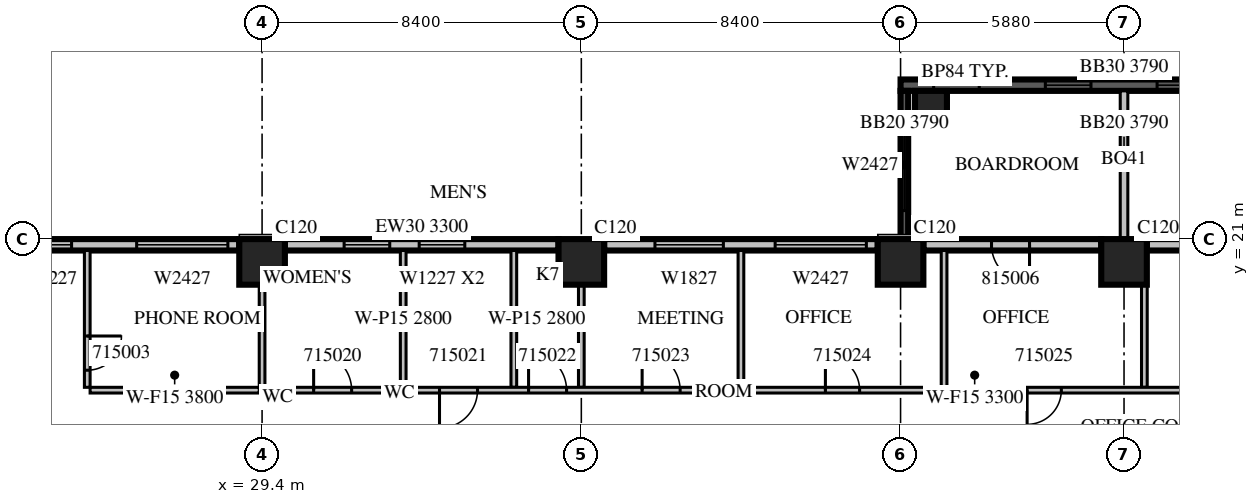
"""IFC4 building model, lengths in metres.
Left out: names, types, materials, properties, quantities, classifications, styles, units other than length and angle.
Written with IfcOpenShell. Run it as: python <this file> out.ifc"""

import sys

from ifc_helpers import new_model, si_unit, direction, frame, frame_2d, origin, origin_2d, place, context, subcontext, project, spatial, rectangle, extrude, source, transform, mapped, element, fill, save


model = new_model("IFC4")
c1 = context("Model", 3, precision=1e-05, world=origin(), true_north=direction((0.0, 1.0)))
c2 = subcontext(c1, "Body", "Model", "MODEL_VIEW")
j1 = project(units=[si_unit("LENGTHUNIT", "METRE"), si_unit("PLANEANGLEUNIT", "RADIAN")], contexts=[c1])
p1 = place(None, origin())
s1 = spatial("IfcSite", under=j1, at=p1, CompositionType="ELEMENT")
p2 = place(p1, origin())
s2 = spatial("IfcBuilding", under=s1, at=p2, CompositionType="ELEMENT")
p3 = place(p2, frame((0.0, 0.0, 74.1)))
s3 = spatial("IfcBuildingStorey", under=s2, at=p3, CompositionType="ELEMENT", Elevation=74.1)
m1 = source(origin(), c2, "Body", "SweptSolid", [
    extrude(rectangle(XDim=1.2, YDim=1.2, at=origin_2d()), origin(), (0.0, 0.0, 1.0), 4.2),
])
for number, where, z_axis, x_axis in (
    (1, (29.4, 20.4, 0.0), (0.0, 0.0, 1.0), (1.0, 0.0, 0.0)),
    (2, (37.8, 20.4, 0.0), (0.0, 0.0, 1.0), (1.0, 0.0, 0.0)),
    (3, (46.2, 20.4, 0.0), (0.0, 0.0, 1.0), (1.0, 0.0, 0.0)),
    (4, (52.08, 20.4, 0.0), (0.0, 0.0, 1.0), (1.0, 0.0, 0.0)),
):
    element("IfcColumn", number, at=place(p3, frame(where, z_axis=z_axis, x_axis=x_axis)), inside=s3, PredefinedType="COLUMN", context=c2, shape_type="MappedRepresentation", body=[
        mapped(m1, transform((0.0, 0.0, 0.0), scale=1.0)),
    ])
m2 = source(origin(), c2, "Body", "SweptSolid", [
    extrude(rectangle(XDim=0.84, YDim=0.84, at=origin_2d()), origin(), (0.0, 0.0, 1.0), 4.2),
])
p4 = place(p3, frame((47.0, 24.48, 0.0), z_axis=(0.0, 0.0, 1.0), x_axis=(1.0, 0.0, 0.0)))
e5 = element("IfcColumn", 5, at=p4, inside=s3, PredefinedType="COLUMN", context=c2, shape_type="MappedRepresentation", body=[
    mapped(m2, transform((0.0, 0.0, 0.0), scale=1.0)),
])
m3 = source(origin(), c2, "Body", "SweptSolid", [
    extrude(rectangle(XDim=11.76, YDim=0.3, at=frame_2d((5.88, 0.0))), origin(), (0.0, 0.0, 1.0), 3.79),
])
p5 = place(p3, frame((57.96, 25.05, 0.0), z_axis=(0.0, 0.0, 1.0), x_axis=(-1.0, 0.0, 0.0)))
e6 = element("IfcWall", 6, at=p5, inside=s3, PredefinedType="SOLIDWALL", context=c2, shape_type="MappedRepresentation", body=[
    mapped(m3, transform((0.0, 0.0, 0.0), scale=1.0)),
])
m4 = source(origin(), c2, "Body", "SweptSolid", [
    extrude(rectangle(XDim=1.2, YDim=2.7, at=frame_2d((0.6, 1.35))), frame((0.0, 0.16, 0.0), z_axis=(0.0, -1.0, 0.0), x_axis=(1.0, 0.0, 0.0)), (0.0, 0.0, 1.0), 0.32),
])
p6 = place(p5, frame((0.87, 0.0, 0.6)))
e7 = element("IfcOpeningElement", 7, at=p6, cuts=e6, PredefinedType="OPENING", context=c2, shape_type="MappedRepresentation", body=[
    mapped(m4, transform((0.0, 0.0, 0.0), scale=1.0)),
])
p7 = place(p5, frame((3.81, 0.0, 0.6)))
e8 = element("IfcOpeningElement", 8, at=p7, cuts=e6, PredefinedType="OPENING", context=c2, shape_type="MappedRepresentation", body=[
    mapped(m4, transform((0.0, 0.0, 0.0), scale=1.0)),
])
p8 = place(p5, frame((6.75, 0.0, 0.6)))
e9 = element("IfcOpeningElement", 9, at=p8, cuts=e6, PredefinedType="OPENING", context=c2, shape_type="MappedRepresentation", body=[
    mapped(m4, transform((0.0, 0.0, 0.0), scale=1.0)),
])
p9 = place(p5, frame((9.69, 0.0, 0.6)))
e10 = element("IfcOpeningElement", 10, at=p9, cuts=e6, PredefinedType="OPENING", context=c2, shape_type="MappedRepresentation", body=[
    mapped(m4, transform((0.0, 0.0, 0.0), scale=1.0)),
])
m5 = source(origin(), c2, "Body", "SweptSolid", [
    extrude(rectangle(XDim=3.9, YDim=0.2, at=frame_2d((1.95, 0.0))), origin(), (0.0, 0.0, 1.0), 3.79),
])
p10 = place(p3, frame((52.08, 21.0, 0.0), z_axis=(0.0, 0.0, 1.0), x_axis=(0.0, 1.0, 0.0)))
e11 = element("IfcWall", 11, at=p10, inside=s3, PredefinedType="SOLIDWALL", context=c2, shape_type="MappedRepresentation", body=[
    mapped(m5, transform((0.0, 0.0, 0.0), scale=1.0)),
])
m6 = source(origin(), c2, "Body", "SweptSolid", [
    extrude(rectangle(XDim=3.9, YDim=0.2, at=frame_2d((1.95, 0.0))), origin(), (0.0, 0.0, 1.0), 3.79),
])
p11 = place(p3, frame((46.3, 21.0, 0.0), z_axis=(0.0, 0.0, 1.0), x_axis=(0.0, 1.0, 0.0)))
e12 = element("IfcWall", 12, at=p11, inside=s3, PredefinedType="SOLIDWALL", context=c2, shape_type="MappedRepresentation", body=[
    mapped(m6, transform((0.0, 0.0, 0.0), scale=1.0)),
])
m7 = source(origin(), c2, "Body", "SweptSolid", [
    extrude(rectangle(XDim=2.4, YDim=2.7, at=frame_2d((1.2, 1.35))), frame((0.0, 0.11, 0.0), z_axis=(0.0, -1.0, 0.0), x_axis=(1.0, 0.0, 0.0)), (0.0, 0.0, 1.0), 0.22),
])
p12 = place(p11, frame((0.75, 0.0, 0.6)))
e13 = element("IfcOpeningElement", 13, at=p12, cuts=e12, PredefinedType="OPENING", context=c2, shape_type="MappedRepresentation", body=[
    mapped(m7, transform((0.0, 0.0, 0.0), scale=1.0)),
])
m8 = source(origin(), c2, "Body", "SweptSolid", [
    extrude(rectangle(XDim=4.68, YDim=0.3, at=frame_2d((2.34, 0.0))), origin(), (0.0, 0.0, 1.0), 3.8),
])
p13 = place(p3, frame((57.36, 20.85, 0.0), z_axis=(0.0, 0.0, 1.0), x_axis=(-1.0, 0.0, 0.0)))
e14 = element("IfcWall", 14, at=p13, inside=s3, PredefinedType="STANDARD", context=c2, shape_type="MappedRepresentation", body=[
    mapped(m8, transform((0.0, 0.0, 0.0), scale=1.0)),
])
m9 = source(origin(), c2, "Body", "SweptSolid", [
    extrude(rectangle(XDim=1.0, YDim=2.1, at=frame_2d((0.5, 1.05))), frame((0.0, 0.16, 0.0), z_axis=(0.0, -1.0, 0.0), x_axis=(1.0, 0.0, 0.0)), (0.0, 0.0, 1.0), 0.32),
])
p14 = place(p13, frame((1.793, 0.0, 0.0)))
e15 = element("IfcOpeningElement", 15, at=p14, cuts=e14, PredefinedType="OPENING", context=c2, shape_type="MappedRepresentation", body=[
    mapped(m9, transform((0.0, 0.0, 0.0), scale=1.0)),
])
p15 = place(p3, frame((51.48, 20.85, 0.0), z_axis=(0.0, 0.0, 1.0), x_axis=(-1.0, 0.0, 0.0)))
e16 = element("IfcWall", 16, at=p15, inside=s3, PredefinedType="STANDARD", context=c2, shape_type="MappedRepresentation", body=[
    mapped(m8, transform((0.0, 0.0, 0.0), scale=1.0)),
])
p16 = place(p15, frame((1.887, 0.0, 0.0)))
e17 = element("IfcOpeningElement", 17, at=p16, cuts=e16, PredefinedType="OPENING", context=c2, shape_type="MappedRepresentation", body=[
    mapped(m9, transform((0.0, 0.0, 0.0), scale=1.0)),
])
m10 = source(origin(), c2, "Body", "SweptSolid", [
    extrude(rectangle(XDim=7.2, YDim=0.3, at=frame_2d((3.6, 0.0))), origin(), (0.0, 0.0, 1.0), 3.8),
])
p17 = place(p3, frame((45.6, 20.85, 0.0), z_axis=(0.0, 0.0, 1.0), x_axis=(-1.0, 0.0, 0.0)))
e18 = element("IfcWall", 18, at=p17, inside=s3, PredefinedType="STANDARD", context=c2, shape_type="MappedRepresentation", body=[
    mapped(m10, transform((0.0, 0.0, 0.0), scale=1.0)),
])
m11 = source(origin(), c2, "Body", "SweptSolid", [
    extrude(rectangle(XDim=2.4, YDim=2.7, at=frame_2d((1.2, 1.35))), frame((0.0, 0.16, 0.0), z_axis=(0.0, -1.0, 0.0), x_axis=(1.0, 0.0, 0.0)), (0.0, 0.0, 1.0), 0.32),
])
p18 = place(p17, frame((0.3, 0.0, 0.6)))
e19 = element("IfcOpeningElement", 19, at=p18, cuts=e18, PredefinedType="OPENING", context=c2, shape_type="MappedRepresentation", body=[
    mapped(m11, transform((0.0, 0.0, 0.0), scale=1.0)),
])
m12 = source(origin(), c2, "Body", "SweptSolid", [
    extrude(rectangle(XDim=1.8, YDim=2.7, at=frame_2d((0.9, 1.35))), frame((0.0, 0.16, 0.0), z_axis=(0.0, -1.0, 0.0), x_axis=(1.0, 0.0, 0.0)), (0.0, 0.0, 1.0), 0.32),
])
p19 = place(p17, frame((4.062, 0.0, 0.6)))
e20 = element("IfcOpeningElement", 20, at=p19, cuts=e18, PredefinedType="OPENING", context=c2, shape_type="MappedRepresentation", body=[
    mapped(m12, transform((0.0, 0.0, 0.0), scale=1.0)),
])
m13 = source(origin(), c2, "Body", "SweptSolid", [
    extrude(rectangle(XDim=7.2, YDim=0.3, at=frame_2d((3.6, 0.0))), origin(), (0.0, 0.0, 1.0), 3.3),
])
p20 = place(p3, frame((37.2, 20.85, 0.0), z_axis=(0.0, 0.0, 1.0), x_axis=(-1.0, 0.0, 0.0)))
e21 = element("IfcWall", 21, at=p20, inside=s3, PredefinedType="STANDARD", context=c2, shape_type="MappedRepresentation", body=[
    mapped(m13, transform((0.0, 0.0, 0.0), scale=1.0)),
])
p21 = place(p20, frame((2.466, 0.0, 0.6)))
e22 = element("IfcOpeningElement", 22, at=p21, cuts=e21, PredefinedType="OPENING", context=c2, shape_type="MappedRepresentation", body=[
    mapped(m4, transform((0.0, 0.0, 0.0), scale=1.0)),
])
p22 = place(p20, frame((4.441, 0.0, 0.6)))
e23 = element("IfcOpeningElement", 23, at=p22, cuts=e21, PredefinedType="OPENING", context=c2, shape_type="MappedRepresentation", body=[
    mapped(m4, transform((0.0, 0.0, 0.0), scale=1.0)),
])
m14 = source(origin(), c2, "Body", "SweptSolid", [
    extrude(rectangle(XDim=6.6, YDim=0.3, at=frame_2d((3.3, 0.0))), origin(), (0.0, 0.0, 1.0), 3.8),
])
p23 = place(p3, frame((28.8, 20.85, 0.0), z_axis=(0.0, 0.0, 1.0), x_axis=(-1.0, 0.0, 0.0)))
e24 = element("IfcWall", 24, at=p23, inside=s3, PredefinedType="STANDARD", context=c2, shape_type="MappedRepresentation", body=[
    mapped(m14, transform((0.0, 0.0, 0.0), scale=1.0)),
])
p24 = place(p23, frame((0.3, 0.0, 0.6)))
e25 = element("IfcOpeningElement", 25, at=p24, cuts=e24, PredefinedType="OPENING", context=c2, shape_type="MappedRepresentation", body=[
    mapped(m11, transform((0.0, 0.0, 0.0), scale=1.0)),
])
p25 = place(p23, frame((4.412, 0.0, 0.6)))
e26 = element("IfcOpeningElement", 26, at=p25, cuts=e24, PredefinedType="OPENING", context=c2, shape_type="MappedRepresentation", body=[
    mapped(m4, transform((0.0, 0.0, 0.0), scale=1.0)),
])
m15 = source(origin(), c2, "Body", "SweptSolid", [
    extrude(rectangle(XDim=3.6, YDim=0.15, at=frame_2d((1.8, 0.0))), origin(), (0.0, 0.0, 1.0), 3.8),
])
p26 = place(p3, frame((24.8, 20.7, 0.0), z_axis=(0.0, 0.0, 1.0), x_axis=(0.0, -1.0, 0.0)))
e27 = element("IfcWall", 27, at=p26, inside=s3, PredefinedType="PARTITIONING", context=c2, shape_type="MappedRepresentation", body=[
    mapped(m15, transform((0.0, 0.0, 0.0), scale=1.0)),
])
m16 = source(origin(), c2, "Body", "SweptSolid", [
    extrude(rectangle(XDim=0.9, YDim=2.1, at=frame_2d((0.45, 1.05))), frame((0.0, 0.085, 0.0), z_axis=(0.0, -1.0, 0.0), x_axis=(1.0, 0.0, 0.0)), (0.0, 0.0, 1.0), 0.17),
])
p27 = place(p26, frame((2.25, 0.0, 0.0)))
e28 = element("IfcOpeningElement", 28, at=p27, cuts=e27, PredefinedType="OPENING", context=c2, shape_type="MappedRepresentation", body=[
    mapped(m16, transform((0.0, 0.0, 0.0), scale=1.0)),
])
m17 = source(origin(), c2, "Body", "SweptSolid", [
    extrude(rectangle(XDim=4.45, YDim=0.15, at=frame_2d((2.225, 0.0))), origin(), (0.0, 0.0, 1.0), 3.8),
])
p28 = place(p3, frame((24.875, 17.025, 0.0), z_axis=(0.0, 0.0, 1.0), x_axis=(1.0, 0.0, 0.0)))
e29 = element("IfcWall", 29, at=p28, inside=s3, PredefinedType="PARTITIONING", context=c2, shape_type="MappedRepresentation", body=[
    mapped(m17, transform((0.0, 0.0, 0.0), scale=1.0)),
])
m18 = source(origin(), c2, "Body", "SweptSolid", [
    extrude(rectangle(XDim=2.701, YDim=0.15, at=frame_2d((1.351, 0.0))), origin(), (0.0, 0.0, 1.0), 3.8),
])
p29 = place(p3, frame((29.4, 17.1, 0.0), z_axis=(0.0, 0.0, 1.0), x_axis=(0.0, 1.0, 0.0)))
e30 = element("IfcWall", 30, at=p29, inside=s3, PredefinedType="PARTITIONING", context=c2, shape_type="MappedRepresentation", body=[
    mapped(m18, transform((0.0, 0.0, 0.0), scale=1.0)),
])
m19 = source(origin(), c2, "Body", "SweptSolid", [
    extrude(rectangle(XDim=3.6, YDim=0.15, at=frame_2d((1.8, 0.0))), origin(), (0.0, 0.0, 1.0), 2.8),
])
for number, where, z_axis, x_axis in (
    (31, (33.113, 20.7, 0.0), (0.0, 0.0, 1.0), (0.0, -1.0, 0.0)),
    (32, (36.024, 20.7, 0.0), (0.0, 0.0, 1.0), (0.0, -1.0, 0.0)),
):
    element("IfcWall", number, at=place(p3, frame(where, z_axis=z_axis, x_axis=x_axis)), inside=s3, PredefinedType="PARTITIONING", context=c2, shape_type="MappedRepresentation", body=[
        mapped(m19, transform((0.0, 0.0, 0.0), scale=1.0)),
    ])
p30 = place(p3, frame((47.345, 20.7, 0.0), z_axis=(0.0, 0.0, 1.0), x_axis=(0.0, -1.0, 0.0)))
e33 = element("IfcWall", 33, at=p30, inside=s3, PredefinedType="PARTITIONING", context=c2, shape_type="MappedRepresentation", body=[
    mapped(m15, transform((0.0, 0.0, 0.0), scale=1.0)),
])
for number, where, z_axis, x_axis in (
    (34, (52.615, 19.801, 0.0), (0.0, 0.0, 1.0), (0.0, -1.0, 0.0)),
    (35, (37.8, 17.1, 0.0), (0.0, 0.0, 1.0), (0.0, 1.0, 0.0)),
):
    element("IfcWall", number, at=place(p3, frame(where, z_axis=z_axis, x_axis=x_axis)), inside=s3, PredefinedType="PARTITIONING", context=c2, shape_type="MappedRepresentation", body=[
        mapped(m18, transform((0.0, 0.0, 0.0), scale=1.0)),
    ])
p31 = place(p3, frame((42.0, 17.1, 0.0), z_axis=(0.0, 0.0, 1.0), x_axis=(0.0, 1.0, 0.0)))
e36 = element("IfcWall", 36, at=p31, inside=s3, PredefinedType="PARTITIONING", context=c2, shape_type="MappedRepresentation", body=[
    mapped(m15, transform((0.0, 0.0, 0.0), scale=1.0)),
])
m20 = source(origin(), c2, "Body", "SweptSolid", [
    extrude(rectangle(XDim=37.5, YDim=0.15, at=frame_2d((18.75, 0.0))), origin(), (0.0, 0.0, 1.0), 3.3),
])
p32 = place(p3, frame((29.4, 17.025, 0.0), z_axis=(0.0, 0.0, 1.0), x_axis=(1.0, 0.0, 0.0)))
e37 = element("IfcWall", 37, at=p32, inside=s3, PredefinedType="PARTITIONING", context=c2, shape_type="MappedRepresentation", body=[
    mapped(m20, transform((0.0, 0.0, 0.0), scale=1.0)),
])
m21 = source(origin(), c2, "Body", "SweptSolid", [
    extrude(rectangle(XDim=1.0, YDim=2.1, at=frame_2d((0.5, 1.05))), frame((0.0, 0.085, 0.0), z_axis=(0.0, -1.0, 0.0), x_axis=(1.0, 0.0, 0.0)), (0.0, 0.0, 1.0), 0.17),
])
p33 = place(p32, frame((1.357, 0.0, 0.0)))
e38 = element("IfcOpeningElement", 38, at=p33, cuts=e37, PredefinedType="OPENING", context=c2, shape_type="MappedRepresentation", body=[
    mapped(m21, transform((0.0, 0.0, 0.0), scale=1.0)),
])
p34 = place(p32, frame((4.669, 0.0, 0.0)))
e39 = element("IfcOpeningElement", 39, at=p34, cuts=e37, PredefinedType="OPENING", context=c2, shape_type="MappedRepresentation", body=[
    mapped(m21, transform((0.0, 0.0, 0.0), scale=1.0)),
])
p35 = place(p32, frame((7.012, 0.0, 0.0)))
e40 = element("IfcOpeningElement", 40, at=p35, cuts=e37, PredefinedType="OPENING", context=c2, shape_type="MappedRepresentation", body=[
    mapped(m21, transform((0.0, 0.0, 0.0), scale=1.0)),
])
p36 = place(p32, frame((10.0, 0.0, 0.0)))
e41 = element("IfcOpeningElement", 41, at=p36, cuts=e37, PredefinedType="OPENING", context=c2, shape_type="MappedRepresentation", body=[
    mapped(m21, transform((0.0, 0.0, 0.0), scale=1.0)),
])
p37 = place(p32, frame((14.822, 0.0, 0.0)))
e42 = element("IfcOpeningElement", 42, at=p37, cuts=e37, PredefinedType="OPENING", context=c2, shape_type="MappedRepresentation", body=[
    mapped(m16, transform((0.0, 0.0, 0.0), scale=1.0)),
])
p38 = place(p32, frame((20.13, 0.0, 0.0)))
e43 = element("IfcOpeningElement", 43, at=p38, cuts=e37, PredefinedType="OPENING", context=c2, shape_type="MappedRepresentation", body=[
    mapped(m16, transform((0.0, 0.0, 0.0), scale=1.0)),
])
p39 = place(p32, frame((25.438, 0.0, 0.0)))
e44 = element("IfcOpeningElement", 44, at=p39, cuts=e37, PredefinedType="OPENING", context=c2, shape_type="MappedRepresentation", body=[
    mapped(m16, transform((0.0, 0.0, 0.0), scale=1.0)),
])
p40 = place(p32, frame((30.364, 0.0, 0.0)))
e45 = element("IfcOpeningElement", 45, at=p40, cuts=e37, PredefinedType="OPENING", context=c2, shape_type="MappedRepresentation", body=[
    mapped(m16, transform((0.0, 0.0, 0.0), scale=1.0)),
])
p41 = place(p32, frame((34.871, 0.0, 0.0)))
e46 = element("IfcOpeningElement", 46, at=p41, cuts=e37, PredefinedType="OPENING", context=c2, shape_type="MappedRepresentation", body=[
    mapped(m16, transform((0.0, 0.0, 0.0), scale=1.0)),
])
m22 = source(origin(), c2, "Body", "SweptSolid", [
    extrude(rectangle(XDim=1.2, YDim=2.7, at=frame_2d((0.6, 1.35))), frame((0.0, 0.03, 0.0), z_axis=(0.0, -1.0, 0.0), x_axis=(1.0, 0.0, 0.0)), (0.0, 0.0, 1.0), 0.06),
])
p42 = place(p7, origin())
e47 = element("IfcWindow", 47, at=p42, inside=s3, PartitioningType="SINGLE_PANEL", PredefinedType="WINDOW", context=c2, shape_type="MappedRepresentation", body=[
    mapped(m22, transform((0.0, 0.0, 0.0), scale=1.0)),
])
fill(e8, e47)
p43 = place(p8, origin())
e48 = element("IfcWindow", 48, at=p43, inside=s3, PartitioningType="SINGLE_PANEL", PredefinedType="WINDOW", context=c2, shape_type="MappedRepresentation", body=[
    mapped(m22, transform((0.0, 0.0, 0.0), scale=1.0)),
])
fill(e9, e48)
p44 = place(p9, origin())
e49 = element("IfcWindow", 49, at=p44, inside=s3, PartitioningType="SINGLE_PANEL", PredefinedType="WINDOW", context=c2, shape_type="MappedRepresentation", body=[
    mapped(m22, transform((0.0, 0.0, 0.0), scale=1.0)),
])
fill(e10, e49)
m23 = source(origin(), c2, "Body", "SweptSolid", [
    extrude(rectangle(XDim=2.4, YDim=2.7, at=frame_2d((1.2, 1.35))), frame((0.0, 0.03, 0.0), z_axis=(0.0, -1.0, 0.0), x_axis=(1.0, 0.0, 0.0)), (0.0, 0.0, 1.0), 0.06),
])
p45 = place(p12, origin())
e50 = element("IfcWindow", 50, at=p45, inside=s3, PartitioningType="SINGLE_PANEL", PredefinedType="WINDOW", context=c2, shape_type="MappedRepresentation", body=[
    mapped(m23, transform((0.0, 0.0, 0.0), scale=1.0)),
])
fill(e13, e50)
p46 = place(p18, origin())
e51 = element("IfcWindow", 51, at=p46, inside=s3, PartitioningType="SINGLE_PANEL", PredefinedType="WINDOW", context=c2, shape_type="MappedRepresentation", body=[
    mapped(m23, transform((0.0, 0.0, 0.0), scale=1.0)),
])
fill(e19, e51)
p47 = place(p21, origin())
e52 = element("IfcWindow", 52, at=p47, inside=s3, PartitioningType="SINGLE_PANEL", PredefinedType="WINDOW", context=c2, shape_type="MappedRepresentation", body=[
    mapped(m22, transform((0.0, 0.0, 0.0), scale=1.0)),
])
fill(e22, e52)
p48 = place(p22, origin())
e53 = element("IfcWindow", 53, at=p48, inside=s3, PartitioningType="SINGLE_PANEL", PredefinedType="WINDOW", context=c2, shape_type="MappedRepresentation", body=[
    mapped(m22, transform((0.0, 0.0, 0.0), scale=1.0)),
])
fill(e23, e53)
p49 = place(p24, origin())
e54 = element("IfcWindow", 54, at=p49, inside=s3, PartitioningType="SINGLE_PANEL", PredefinedType="WINDOW", context=c2, shape_type="MappedRepresentation", body=[
    mapped(m23, transform((0.0, 0.0, 0.0), scale=1.0)),
])
fill(e25, e54)
m24 = source(origin(), c2, "Body", "SweptSolid", [
    extrude(rectangle(XDim=1.8, YDim=2.7, at=frame_2d((0.9, 1.35))), frame((0.0, 0.03, 0.0), z_axis=(0.0, -1.0, 0.0), x_axis=(1.0, 0.0, 0.0)), (0.0, 0.0, 1.0), 0.06),
])
p50 = place(p19, origin())
e55 = element("IfcWindow", 55, at=p50, inside=s3, PartitioningType="SINGLE_PANEL", PredefinedType="WINDOW", context=c2, shape_type="MappedRepresentation", body=[
    mapped(m24, transform((0.0, 0.0, 0.0), scale=1.0)),
])
fill(e20, e55)
p51 = place(p25, origin())
e56 = element("IfcWindow", 56, at=p51, inside=s3, PartitioningType="SINGLE_PANEL", PredefinedType="WINDOW", context=c2, shape_type="MappedRepresentation", body=[
    mapped(m22, transform((0.0, 0.0, 0.0), scale=1.0)),
])
fill(e26, e56)
m25 = source(origin(), c2, "Body", "SweptSolid", [
    extrude(rectangle(XDim=0.9, YDim=2.1, at=frame_2d((0.45, 1.05))), frame((0.0, 0.025, 0.0), z_axis=(0.0, -1.0, 0.0), x_axis=(1.0, 0.0, 0.0)), (0.0, 0.0, 1.0), 0.05),
])
p52 = place(p27, origin())
e57 = element("IfcDoor", 57, at=p52, inside=s3, OperationType="SINGLE_SWING_LEFT", PredefinedType="DOOR", context=c2, shape_type="MappedRepresentation", body=[
    mapped(m25, transform((0.0, 0.0, 0.0), scale=1.0)),
])
fill(e28, e57)
m26 = source(origin(), c2, "Body", "SweptSolid", [
    extrude(rectangle(XDim=1.0, YDim=2.1, at=frame_2d((0.5, 1.05))), frame((0.0, 0.025, 0.0), z_axis=(0.0, -1.0, 0.0), x_axis=(1.0, 0.0, 0.0)), (0.0, 0.0, 1.0), 0.05),
])
p53 = place(p33, origin())
e58 = element("IfcDoor", 58, at=p53, inside=s3, OperationType="SINGLE_SWING_LEFT", PredefinedType="DOOR", context=c2, shape_type="MappedRepresentation", body=[
    mapped(m26, transform((0.0, 0.0, 0.0), scale=1.0)),
])
fill(e38, e58)
p54 = place(p34, origin())
e59 = element("IfcDoor", 59, at=p54, inside=s3, OperationType="SINGLE_SWING_RIGHT", PredefinedType="DOOR", context=c2, shape_type="MappedRepresentation", body=[
    mapped(m26, transform((0.0, 0.0, 0.0), scale=1.0)),
])
fill(e39, e59)
p55 = place(p35, origin())
e60 = element("IfcDoor", 60, at=p55, inside=s3, OperationType="SINGLE_SWING_LEFT", PredefinedType="DOOR", context=c2, shape_type="MappedRepresentation", body=[
    mapped(m26, transform((0.0, 0.0, 0.0), scale=1.0)),
])
fill(e40, e60)
p56 = place(p36, origin())
e61 = element("IfcDoor", 61, at=p56, inside=s3, OperationType="SINGLE_SWING_LEFT", PredefinedType="DOOR", context=c2, shape_type="MappedRepresentation", body=[
    mapped(m26, transform((0.0, 0.0, 0.0), scale=1.0)),
])
fill(e41, e61)
p57 = place(p37, origin())
e62 = element("IfcDoor", 62, at=p57, inside=s3, OperationType="SINGLE_SWING_LEFT", PredefinedType="DOOR", context=c2, shape_type="MappedRepresentation", body=[
    mapped(m25, transform((0.0, 0.0, 0.0), scale=1.0)),
])
fill(e42, e62)
p58 = place(p38, origin())
e63 = element("IfcDoor", 63, at=p58, inside=s3, OperationType="SINGLE_SWING_RIGHT", PredefinedType="DOOR", context=c2, shape_type="MappedRepresentation", body=[
    mapped(m25, transform((0.0, 0.0, 0.0), scale=1.0)),
])
fill(e43, e63)
p59 = place(p16, origin())
e64 = element("IfcDoor", 64, at=p59, inside=s3, OperationType="SINGLE_SWING_LEFT", PredefinedType="DOOR", context=c2, shape_type="MappedRepresentation", body=[
    mapped(m26, transform((0.0, 0.0, 0.0), scale=1.0)),
])
fill(e17, e64)
save(model, sys.argv[1])
